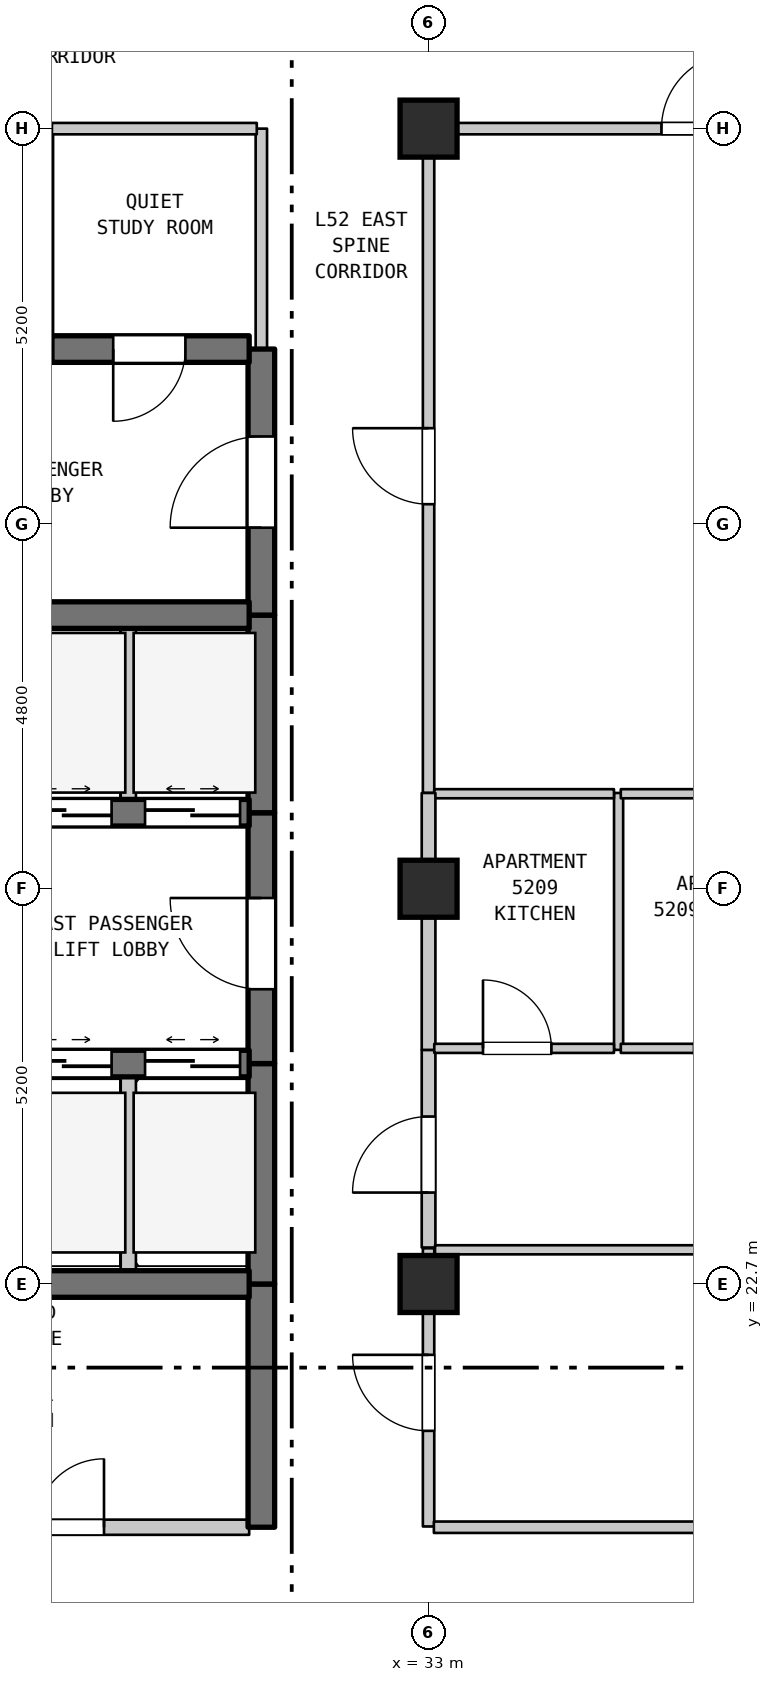
"""IFC4 building model, lengths in metres.
Left out: names, types, materials, properties, quantities, classifications, styles, units other than length and angle.
Written with IfcOpenShell. Run it as: python <this file> out.ifc"""

import sys

from ifc_helpers import new_model, si_unit, direction, frame, frame_2d, origin, origin_2d, place, context, subcontext, project, spatial, rectangle, extrude, element, fill, save


model = new_model("IFC4")
c1 = context("Model", 3, precision=1e-05, world=origin(), true_north=direction((0.0, 1.0)))
c2 = subcontext(c1, "Body", "Model", "MODEL_VIEW")
j1 = project(units=[si_unit("LENGTHUNIT", "METRE"), si_unit("PLANEANGLEUNIT", "RADIAN")], contexts=[c1])
p1 = place(None, origin())
s1 = spatial("IfcSite", under=j1, at=p1, CompositionType="ELEMENT")
p2 = place(p1, origin())
s2 = spatial("IfcBuilding", under=s1, at=p2, CompositionType="ELEMENT")
p3 = place(p2, frame((0.0, 0.0, 210.6)))
s3 = spatial("IfcBuildingStorey", under=s2, at=p3, CompositionType="ELEMENT", Elevation=210.6)
for number, where, z_axis, x_axis in (
    (1, (33.0, 22.7, 0.0), (0.0, 0.0, 1.0), (1.0, 0.0, 0.0)),
    (2, (33.0, 27.9, 0.0), (0.0, 0.0, 1.0), (1.0, 0.0, 0.0)),
    (3, (33.0, 37.9, 0.0), (0.0, 0.0, 1.0), (1.0, 0.0, 0.0)),
):
    element("IfcColumn", number, at=place(p3, frame(where, z_axis=z_axis, x_axis=x_axis)), inside=s3, PredefinedType="COLUMN", context=c2, shape_type="SweptSolid", body=[
        extrude(rectangle(XDim=0.75, YDim=0.75, at=origin_2d()), origin(), (0.0, 0.0, 1.0), 3.7),
    ])
p4 = place(p3, frame((28.0, 35.0, 0.0), z_axis=(0.0, 0.0, 1.0), x_axis=(0.0, 1.0, 0.0)))
e4 = element("IfcWall", 4, at=p4, inside=s3, PredefinedType="PARTITIONING", context=c2, shape_type="SweptSolid", body=[
    extrude(rectangle(XDim=2.9, YDim=0.12, at=frame_2d((1.45, 0.0))), origin(), (0.0, 0.0, 1.0), 3.39),
])
p5 = place(p3, frame((29.05, 22.7, 0.0), z_axis=(0.0, 0.0, 1.0), x_axis=(0.0, 1.0, 0.0)))
e5 = element("IfcWall", 5, at=p5, inside=s3, PredefinedType="STANDARD", context=c2, shape_type="SweptSolid", body=[
    extrude(rectangle(XDim=2.9, YDim=0.2, at=frame_2d((1.45, 0.0))), origin(), (0.0, 0.0, 1.0), 3.39),
])
p6 = place(p3, frame((29.05, 28.9, 0.0), z_axis=(0.0, 0.0, 1.0), x_axis=(0.0, 1.0, 0.0)))
e6 = element("IfcWall", 6, at=p6, inside=s3, PredefinedType="STANDARD", context=c2, shape_type="SweptSolid", body=[
    extrude(rectangle(XDim=2.6, YDim=0.2, at=frame_2d((1.3, 0.0))), origin(), (0.0, 0.0, 1.0), 3.39),
])
p7 = place(p3, frame((30.8, 19.5, 0.0), z_axis=(0.0, 0.0, 1.0), x_axis=(0.0, 1.0, 0.0)))
e7 = element("IfcWall", 7, at=p7, inside=s3, PredefinedType="SHEAR", context=c2, shape_type="SweptSolid", body=[
    extrude(rectangle(XDim=3.2, YDim=0.35, at=frame_2d((1.6, 0.0))), origin(), (0.0, 0.0, 1.0), 3.39),
])
p8 = place(p3, frame((30.8, 22.7, 0.0), z_axis=(0.0, 0.0, 1.0), x_axis=(0.0, 1.0, 0.0)))
e8 = element("IfcWall", 8, at=p8, inside=s3, PredefinedType="SHEAR", context=c2, shape_type="SweptSolid", body=[
    extrude(rectangle(XDim=2.9, YDim=0.35, at=frame_2d((1.45, 0.0))), origin(), (0.0, 0.0, 1.0), 3.39),
])
p9 = place(p3, frame((30.8, 25.6, 0.0), z_axis=(0.0, 0.0, 1.0), x_axis=(0.0, 1.0, 0.0)))
e9 = element("IfcWall", 9, at=p9, inside=s3, PredefinedType="SHEAR", context=c2, shape_type="SweptSolid", body=[
    extrude(rectangle(XDim=3.3, YDim=0.35, at=frame_2d((1.65, 0.0))), origin(), (0.0, 0.0, 1.0), 3.39),
])
p10 = place(p9, frame((0.978, 0.0, 0.0)))
e10 = element("IfcOpeningElement", 10, at=p10, cuts=e9, PredefinedType="OPENING", context=c2, shape_type="SweptSolid", body=[
    extrude(rectangle(XDim=1.2, YDim=2.2, at=frame_2d((0.6, 1.1))), frame((0.0, 0.185, 0.0), z_axis=(0.0, -1.0, 0.0), x_axis=(1.0, 0.0, 0.0)), (0.0, 0.0, 1.0), 0.37),
])
p11 = place(p3, frame((30.8, 28.9, 0.0), z_axis=(0.0, 0.0, 1.0), x_axis=(0.0, 1.0, 0.0)))
e11 = element("IfcWall", 11, at=p11, inside=s3, PredefinedType="SHEAR", context=c2, shape_type="SweptSolid", body=[
    extrude(rectangle(XDim=2.6, YDim=0.35, at=frame_2d((1.3, 0.0))), origin(), (0.0, 0.0, 1.0), 3.39),
])
p12 = place(p3, frame((30.8, 31.5, 0.0), z_axis=(0.0, 0.0, 1.0), x_axis=(0.0, 1.0, 0.0)))
e12 = element("IfcWall", 12, at=p12, inside=s3, PredefinedType="SHEAR", context=c2, shape_type="SweptSolid", body=[
    extrude(rectangle(XDim=3.5, YDim=0.35, at=frame_2d((1.75, 0.0))), origin(), (0.0, 0.0, 1.0), 3.39),
])
p13 = place(p12, frame((1.15, 0.0, 0.0)))
e13 = element("IfcOpeningElement", 13, at=p13, cuts=e12, PredefinedType="OPENING", context=c2, shape_type="SweptSolid", body=[
    extrude(rectangle(XDim=1.2, YDim=2.2, at=frame_2d((0.6, 1.1))), frame((0.0, 0.185, 0.0), z_axis=(0.0, -1.0, 0.0), x_axis=(1.0, 0.0, 0.0)), (0.0, 0.0, 1.0), 0.37),
])
p14 = place(p3, frame((30.8, 35.0, 0.0), z_axis=(0.0, 0.0, 1.0), x_axis=(0.0, 1.0, 0.0)))
e14 = element("IfcWall", 14, at=p14, inside=s3, PredefinedType="STANDARD", context=c2, shape_type="SweptSolid", body=[
    extrude(rectangle(XDim=2.9, YDim=0.15, at=frame_2d((1.45, 0.0))), origin(), (0.0, 0.0, 1.0), 3.39),
])
p15 = place(p3, frame((33.0, 19.51, 0.0), z_axis=(0.0, 0.0, 1.0), x_axis=(0.0, 1.0, 0.0)))
e15 = element("IfcWall", 15, at=p15, inside=s3, PredefinedType="STANDARD", context=c2, shape_type="SweptSolid", body=[
    extrude(rectangle(XDim=3.66, YDim=0.15, at=frame_2d((1.83, 0.0))), origin(), (0.0, 0.0, 1.0), 2.99),
])
p16 = place(p15, frame((1.258, 0.0, 0.0)))
e16 = element("IfcOpeningElement", 16, at=p16, cuts=e15, PredefinedType="OPENING", context=c2, shape_type="SweptSolid", body=[
    extrude(rectangle(XDim=1.0, YDim=2.15, at=frame_2d((0.5, 1.075))), frame((0.0, 0.085, 0.0), z_axis=(0.0, -1.0, 0.0), x_axis=(1.0, 0.0, 0.0)), (0.0, 0.0, 1.0), 0.17),
])
p17 = place(p3, frame((33.0, 23.18, 0.0), z_axis=(0.0, 0.0, 1.0), x_axis=(0.0, 1.0, 0.0)))
e17 = element("IfcWall", 17, at=p17, inside=s3, PredefinedType="STANDARD", context=c2, shape_type="SweptSolid", body=[
    extrude(rectangle(XDim=2.6, YDim=0.18, at=frame_2d((1.3, 0.0))), origin(), (0.0, 0.0, 1.0), 2.99),
])
p18 = place(p17, frame((0.723, 0.0, 0.0)))
e18 = element("IfcOpeningElement", 18, at=p18, cuts=e17, PredefinedType="OPENING", context=c2, shape_type="SweptSolid", body=[
    extrude(rectangle(XDim=1.0, YDim=2.15, at=frame_2d((0.5, 1.075))), frame((0.0, 0.1, 0.0), z_axis=(0.0, -1.0, 0.0), x_axis=(1.0, 0.0, 0.0)), (0.0, 0.0, 1.0), 0.2),
])
p19 = place(p3, frame((33.0, 25.78, 0.0), z_axis=(0.0, 0.0, 1.0), x_axis=(0.0, 1.0, 0.0)))
e19 = element("IfcWall", 19, at=p19, inside=s3, PredefinedType="STANDARD", context=c2, shape_type="SweptSolid", body=[
    extrude(rectangle(XDim=2.12, YDim=0.18, at=frame_2d((1.06, 0.0))), origin(), (0.0, 0.0, 1.0), 2.99),
])
p20 = place(p3, frame((33.0, 29.16, 0.0), z_axis=(0.0, 0.0, 1.0), x_axis=(0.0, 1.0, 0.0)))
e20 = element("IfcWall", 20, at=p20, inside=s3, PredefinedType="STANDARD", context=c2, shape_type="SweptSolid", body=[
    extrude(rectangle(XDim=8.74, YDim=0.15, at=frame_2d((4.37, 0.0))), origin(), (0.0, 0.0, 1.0), 2.89),
])
p21 = place(p20, frame((3.799, 0.0, 0.0)))
e21 = element("IfcOpeningElement", 21, at=p21, cuts=e20, PredefinedType="OPENING", context=c2, shape_type="SweptSolid", body=[
    extrude(rectangle(XDim=1.0, YDim=2.15, at=frame_2d((0.5, 1.075))), frame((0.0, 0.085, 0.0), z_axis=(0.0, -1.0, 0.0), x_axis=(1.0, 0.0, 0.0)), (0.0, 0.0, 1.0), 0.17),
])
p22 = place(p3, frame((35.5, 25.78, 0.0), z_axis=(0.0, 0.0, 1.0), x_axis=(0.0, 1.0, 0.0)))
e22 = element("IfcWall", 22, at=p22, inside=s3, PredefinedType="PARTITIONING", context=c2, shape_type="SweptSolid", body=[
    extrude(rectangle(XDim=3.38, YDim=0.12, at=frame_2d((1.69, 0.0))), origin(), (0.0, 0.0, 1.0), 3.39),
])
p23 = place(p3, frame((25.985, 19.5, 0.0), z_axis=(0.0, 0.0, 1.0), x_axis=(1.0, 0.0, 0.0)))
e23 = element("IfcWall", 23, at=p23, inside=s3, PredefinedType="STANDARD", context=c2, shape_type="SweptSolid", body=[
    extrude(rectangle(XDim=4.655, YDim=0.2, at=frame_2d((2.327, 0.0))), origin(), (0.0, 0.0, 1.0), 3.39),
])
p24 = place(p23, frame((1.845, 0.0, 0.0)))
e24 = element("IfcOpeningElement", 24, at=p24, cuts=e23, PredefinedType="OPENING", context=c2, shape_type="SweptSolid", body=[
    extrude(rectangle(XDim=0.9, YDim=2.15, at=frame_2d((0.45, 1.075))), frame((0.0, 0.11, 0.0), z_axis=(0.0, -1.0, 0.0), x_axis=(1.0, 0.0, 0.0)), (0.0, 0.0, 1.0), 0.22),
])
p25 = place(p3, frame((33.07, 19.5, 0.0), z_axis=(0.0, 0.0, 1.0), x_axis=(1.0, 0.0, 0.0)))
e25 = element("IfcWall", 25, at=p25, inside=s3, PredefinedType="STANDARD", context=c2, shape_type="SweptSolid", body=[
    extrude(rectangle(XDim=21.51, YDim=0.15, at=frame_2d((10.755, 0.0))), origin(), (0.0, 0.0, 1.0), 3.39),
])
p26 = place(p25, frame((10.185, 0.0, 0.0)))
e26 = element("IfcOpeningElement", 26, at=p26, cuts=e25, PredefinedType="OPENING", context=c2, shape_type="SweptSolid", body=[
    extrude(rectangle(XDim=1.0, YDim=2.15, at=frame_2d((0.5, 1.075))), frame((0.0, 0.085, 0.0), z_axis=(0.0, -1.0, 0.0), x_axis=(1.0, 0.0, 0.0)), (0.0, 0.0, 1.0), 0.17),
])
p27 = place(p3, frame((27.46, 22.7, 0.0), z_axis=(0.0, 0.0, 1.0), x_axis=(1.0, 0.0, 0.0)))
e27 = element("IfcWall", 27, at=p27, inside=s3, PredefinedType="SHEAR", context=c2, shape_type="SweptSolid", body=[
    extrude(rectangle(XDim=3.18, YDim=0.35, at=frame_2d((1.59, 0.0))), origin(), (0.0, 0.0, 1.0), 3.39),
])
p28 = place(p3, frame((33.085, 23.15, 0.0), z_axis=(0.0, 0.0, 1.0), x_axis=(1.0, 0.0, 0.0)))
e28 = element("IfcWall", 28, at=p28, inside=s3, PredefinedType="PARTITIONING", context=c2, shape_type="SweptSolid", body=[
    extrude(rectangle(XDim=23.905, YDim=0.12, at=frame_2d((11.953, 0.0))), origin(), (0.0, 0.0, 1.0), 3.39),
])
p29 = place(p3, frame((27.46, 25.6, 0.0), z_axis=(0.0, 0.0, 1.0), x_axis=(1.0, 0.0, 0.0)))
e29 = element("IfcWall", 29, at=p29, inside=s3, PredefinedType="SHEAR", context=c2, shape_type="SweptSolid", body=[
    extrude(rectangle(XDim=3.18, YDim=0.35, at=frame_2d((1.59, 0.0))), origin(), (0.0, 0.0, 1.0), 3.39),
])
p30 = place(p29, frame((0.12, 0.0, 0.0)))
e30 = element("IfcOpeningElement", 30, at=p30, cuts=e29, PredefinedType="OPENING", context=c2, shape_type="SweptSolid", body=[
    extrude(rectangle(XDim=1.25, YDim=2.2, at=frame_2d((0.625, 1.1))), frame((0.0, 0.185, 0.0), z_axis=(0.0, -1.0, 0.0), x_axis=(1.0, 0.0, 0.0)), (0.0, 0.0, 1.0), 0.37),
])
p31 = place(p29, frame((1.81, 0.0, 0.0)))
e31 = element("IfcOpeningElement", 31, at=p31, cuts=e29, PredefinedType="OPENING", context=c2, shape_type="SweptSolid", body=[
    extrude(rectangle(XDim=1.25, YDim=2.2, at=frame_2d((0.625, 1.1))), frame((0.0, 0.185, 0.0), z_axis=(0.0, -1.0, 0.0), x_axis=(1.0, 0.0, 0.0)), (0.0, 0.0, 1.0), 0.37),
])
p32 = place(p3, frame((33.075, 25.8, 0.0), z_axis=(0.0, 0.0, 1.0), x_axis=(1.0, 0.0, 0.0)))
e32 = element("IfcWall", 32, at=p32, inside=s3, PredefinedType="PARTITIONING", context=c2, shape_type="SweptSolid", body=[
    extrude(rectangle(XDim=2.364, YDim=0.12, at=frame_2d((1.182, 0.0))), origin(), (0.0, 0.0, 1.0), 3.39),
])
p33 = place(p32, frame((0.641, 0.0, 0.0)))
e33 = element("IfcOpeningElement", 33, at=p33, cuts=e32, PredefinedType="OPENING", context=c2, shape_type="SweptSolid", body=[
    extrude(rectangle(XDim=0.9, YDim=2.15, at=frame_2d((0.45, 1.075))), frame((0.0, 0.07, 0.0), z_axis=(0.0, -1.0, 0.0), x_axis=(1.0, 0.0, 0.0)), (0.0, 0.0, 1.0), 0.14),
])
p34 = place(p3, frame((35.529, 25.8, 0.0), z_axis=(0.0, 0.0, 1.0), x_axis=(1.0, 0.0, 0.0)))
e34 = element("IfcWall", 34, at=p34, inside=s3, PredefinedType="PARTITIONING", context=c2, shape_type="SweptSolid", body=[
    extrude(rectangle(XDim=2.826, YDim=0.12, at=frame_2d((1.413, 0.0))), origin(), (0.0, 0.0, 1.0), 3.39),
])
p35 = place(p34, frame((0.963, 0.0, 0.0)))
e35 = element("IfcOpeningElement", 35, at=p35, cuts=e34, PredefinedType="OPENING", context=c2, shape_type="SweptSolid", body=[
    extrude(rectangle(XDim=0.9, YDim=2.1, at=frame_2d((0.45, 1.05))), frame((0.0, 0.07, 0.0), z_axis=(0.0, -1.0, 0.0), x_axis=(1.0, 0.0, 0.0)), (0.0, 0.0, 1.0), 0.14),
])
p36 = place(p3, frame((27.46, 28.9, 0.0), z_axis=(0.0, 0.0, 1.0), x_axis=(1.0, 0.0, 0.0)))
e36 = element("IfcWall", 36, at=p36, inside=s3, PredefinedType="SHEAR", context=c2, shape_type="SweptSolid", body=[
    extrude(rectangle(XDim=3.18, YDim=0.35, at=frame_2d((1.59, 0.0))), origin(), (0.0, 0.0, 1.0), 3.39),
])
p37 = place(p36, frame((0.12, 0.0, 0.0)))
e37 = element("IfcOpeningElement", 37, at=p37, cuts=e36, PredefinedType="OPENING", context=c2, shape_type="SweptSolid", body=[
    extrude(rectangle(XDim=1.25, YDim=2.2, at=frame_2d((0.625, 1.1))), frame((0.0, 0.185, 0.0), z_axis=(0.0, -1.0, 0.0), x_axis=(1.0, 0.0, 0.0)), (0.0, 0.0, 1.0), 0.37),
])
p38 = place(p36, frame((1.81, 0.0, 0.0)))
e38 = element("IfcOpeningElement", 38, at=p38, cuts=e36, PredefinedType="OPENING", context=c2, shape_type="SweptSolid", body=[
    extrude(rectangle(XDim=1.25, YDim=2.2, at=frame_2d((0.625, 1.1))), frame((0.0, 0.185, 0.0), z_axis=(0.0, -1.0, 0.0), x_axis=(1.0, 0.0, 0.0)), (0.0, 0.0, 1.0), 0.37),
])
p39 = place(p3, frame((33.075, 29.15, 0.0), z_axis=(0.0, 0.0, 1.0), x_axis=(1.0, 0.0, 0.0)))
e39 = element("IfcWall", 39, at=p39, inside=s3, PredefinedType="PARTITIONING", context=c2, shape_type="SweptSolid", body=[
    extrude(rectangle(XDim=2.364, YDim=0.12, at=frame_2d((1.182, 0.0))), origin(), (0.0, 0.0, 1.0), 3.39),
])
p40 = place(p3, frame((35.529, 29.15, 0.0), z_axis=(0.0, 0.0, 1.0), x_axis=(1.0, 0.0, 0.0)))
e40 = element("IfcWall", 40, at=p40, inside=s3, PredefinedType="PARTITIONING", context=c2, shape_type="SweptSolid", body=[
    extrude(rectangle(XDim=2.826, YDim=0.12, at=frame_2d((1.413, 0.0))), origin(), (0.0, 0.0, 1.0), 3.39),
])
p41 = place(p3, frame((27.46, 31.5, 0.0), z_axis=(0.0, 0.0, 1.0), x_axis=(1.0, 0.0, 0.0)))
e41 = element("IfcWall", 41, at=p41, inside=s3, PredefinedType="SHEAR", context=c2, shape_type="SweptSolid", body=[
    extrude(rectangle(XDim=3.18, YDim=0.35, at=frame_2d((1.59, 0.0))), origin(), (0.0, 0.0, 1.0), 3.39),
])
p42 = place(p3, frame((28.045, 35.0, 0.0), z_axis=(0.0, 0.0, 1.0), x_axis=(1.0, 0.0, 0.0)))
e42 = element("IfcWall", 42, at=p42, inside=s3, PredefinedType="SHEAR", context=c2, shape_type="SweptSolid", body=[
    extrude(rectangle(XDim=2.595, YDim=0.35, at=frame_2d((1.297, 0.0))), origin(), (0.0, 0.0, 1.0), 3.39),
])
p43 = place(p42, frame((0.806, 0.0, 0.0)))
e43 = element("IfcOpeningElement", 43, at=p43, cuts=e42, PredefinedType="OPENING", context=c2, shape_type="SweptSolid", body=[
    extrude(rectangle(XDim=0.95, YDim=2.15, at=frame_2d((0.475, 1.075))), frame((0.0, 0.185, 0.0), z_axis=(0.0, -1.0, 0.0), x_axis=(1.0, 0.0, 0.0)), (0.0, 0.0, 1.0), 0.37),
])
p44 = place(p3, frame((28.045, 37.9, 0.0), z_axis=(0.0, 0.0, 1.0), x_axis=(1.0, 0.0, 0.0)))
e44 = element("IfcWall", 44, at=p44, inside=s3, PredefinedType="STANDARD", context=c2, shape_type="SweptSolid", body=[
    extrude(rectangle(XDim=2.695, YDim=0.15, at=frame_2d((1.348, 0.0))), origin(), (0.0, 0.0, 1.0), 2.89),
])
p45 = place(p3, frame((33.06, 37.9, 0.0), z_axis=(0.0, 0.0, 1.0), x_axis=(1.0, 0.0, 0.0)))
e45 = element("IfcWall", 45, at=p45, inside=s3, PredefinedType="STANDARD", context=c2, shape_type="SweptSolid", body=[
    extrude(rectangle(XDim=7.164, YDim=0.15, at=frame_2d((3.582, 0.0))), origin(), (0.0, 0.0, 1.0), 3.39),
])
p46 = place(p45, frame((3.004, 0.0, 0.0)))
e46 = element("IfcOpeningElement", 46, at=p46, cuts=e45, PredefinedType="OPENING", context=c2, shape_type="SweptSolid", body=[
    extrude(rectangle(XDim=1.0, YDim=2.15, at=frame_2d((0.5, 1.075))), frame((0.0, 0.085, 0.0), z_axis=(0.0, -1.0, 0.0), x_axis=(1.0, 0.0, 0.0)), (0.0, 0.0, 1.0), 0.17),
])
p47 = place(p3, frame((33.0, 27.9, 0.0), z_axis=(0.0, 0.0, 1.0), x_axis=(0.0, 1.0, 0.0)))
e47 = element("IfcWall", 47, at=p47, inside=s3, PredefinedType="STANDARD", context=c2, shape_type="SweptSolid", body=[
    extrude(rectangle(XDim=1.26, YDim=0.18, at=frame_2d((0.63, 0.0))), origin(), (0.0, 0.0, 1.0), 2.89),
])
p48 = place(p10, origin())
e48 = element("IfcDoor", 48, at=p48, inside=s3, OperationType="SINGLE_SWING_RIGHT", PredefinedType="DOOR", context=c2, shape_type="SweptSolid", body=[
    extrude(rectangle(XDim=1.2, YDim=2.2, at=frame_2d((0.6, 1.1))), frame((0.0, 0.025, 0.0), z_axis=(0.0, -1.0, 0.0), x_axis=(1.0, 0.0, 0.0)), (0.0, 0.0, 1.0), 0.05),
])
fill(e10, e48)
p49 = place(p13, origin())
e49 = element("IfcDoor", 49, at=p49, inside=s3, OperationType="SINGLE_SWING_LEFT", PredefinedType="DOOR", context=c2, shape_type="SweptSolid", body=[
    extrude(rectangle(XDim=1.2, YDim=2.2, at=frame_2d((0.6, 1.1))), frame((0.0, 0.025, 0.0), z_axis=(0.0, -1.0, 0.0), x_axis=(1.0, 0.0, 0.0)), (0.0, 0.0, 1.0), 0.05),
])
fill(e13, e49)
p50 = place(p16, origin())
e50 = element("IfcDoor", 50, at=p50, inside=s3, OperationType="SINGLE_SWING_RIGHT", PredefinedType="DOOR", context=c2, shape_type="SweptSolid", body=[
    extrude(rectangle(XDim=1.0, YDim=2.15, at=frame_2d((0.5, 1.075))), frame((0.0, 0.025, 0.0), z_axis=(0.0, -1.0, 0.0), x_axis=(1.0, 0.0, 0.0)), (0.0, 0.0, 1.0), 0.05),
])
fill(e16, e50)
p51 = place(p18, origin())
e51 = element("IfcDoor", 51, at=p51, inside=s3, OperationType="SINGLE_SWING_LEFT", PredefinedType="DOOR", context=c2, shape_type="SweptSolid", body=[
    extrude(rectangle(XDim=1.0, YDim=2.15, at=frame_2d((0.5, 1.075))), frame((0.0, 0.025, 0.0), z_axis=(0.0, -1.0, 0.0), x_axis=(1.0, 0.0, 0.0)), (0.0, 0.0, 1.0), 0.05),
])
fill(e18, e51)
p52 = place(p21, origin())
e52 = element("IfcDoor", 52, at=p52, inside=s3, OperationType="SINGLE_SWING_RIGHT", PredefinedType="DOOR", context=c2, shape_type="SweptSolid", body=[
    extrude(rectangle(XDim=1.0, YDim=2.15, at=frame_2d((0.5, 1.075))), frame((0.0, 0.025, 0.0), z_axis=(0.0, -1.0, 0.0), x_axis=(1.0, 0.0, 0.0)), (0.0, 0.0, 1.0), 0.05),
])
fill(e21, e52)
p53 = place(p24, origin())
e53 = element("IfcDoor", 53, at=p53, inside=s3, OperationType="SINGLE_SWING_RIGHT", PredefinedType="DOOR", context=c2, shape_type="SweptSolid", body=[
    extrude(rectangle(XDim=0.9, YDim=2.15, at=frame_2d((0.45, 1.075))), frame((0.0, 0.025, 0.0), z_axis=(0.0, -1.0, 0.0), x_axis=(1.0, 0.0, 0.0)), (0.0, 0.0, 1.0), 0.05),
])
fill(e24, e53)
p54 = place(p30, origin())
e54 = element("IfcDoor", 54, at=p54, inside=s3, OperationType="DOUBLE_DOOR_SLIDING", PredefinedType="DOOR", context=c2, shape_type="SweptSolid", body=[
    extrude(rectangle(XDim=1.25, YDim=2.2, at=frame_2d((0.625, 1.1))), frame((0.0, 0.025, 0.0), z_axis=(0.0, -1.0, 0.0), x_axis=(1.0, 0.0, 0.0)), (0.0, 0.0, 1.0), 0.05),
])
fill(e30, e54)
p55 = place(p31, origin())
e55 = element("IfcDoor", 55, at=p55, inside=s3, OperationType="DOUBLE_DOOR_SLIDING", PredefinedType="DOOR", context=c2, shape_type="SweptSolid", body=[
    extrude(rectangle(XDim=1.25, YDim=2.2, at=frame_2d((0.625, 1.1))), frame((0.0, 0.025, 0.0), z_axis=(0.0, -1.0, 0.0), x_axis=(1.0, 0.0, 0.0)), (0.0, 0.0, 1.0), 0.05),
])
fill(e31, e55)
p56 = place(p33, origin())
e56 = element("IfcDoor", 56, at=p56, inside=s3, OperationType="SINGLE_SWING_LEFT", PredefinedType="DOOR", context=c2, shape_type="SweptSolid", body=[
    extrude(rectangle(XDim=0.9, YDim=2.15, at=frame_2d((0.45, 1.075))), frame((0.0, 0.025, 0.0), z_axis=(0.0, -1.0, 0.0), x_axis=(1.0, 0.0, 0.0)), (0.0, 0.0, 1.0), 0.05),
])
fill(e33, e56)
p57 = place(p37, origin())
e57 = element("IfcDoor", 57, at=p57, inside=s3, OperationType="DOUBLE_DOOR_SLIDING", PredefinedType="DOOR", context=c2, shape_type="SweptSolid", body=[
    extrude(rectangle(XDim=1.25, YDim=2.2, at=frame_2d((0.625, 1.1))), frame((0.0, 0.025, 0.0), z_axis=(0.0, -1.0, 0.0), x_axis=(1.0, 0.0, 0.0)), (0.0, 0.0, 1.0), 0.05),
])
fill(e37, e57)
p58 = place(p38, origin())
e58 = element("IfcDoor", 58, at=p58, inside=s3, OperationType="DOUBLE_DOOR_SLIDING", PredefinedType="DOOR", context=c2, shape_type="SweptSolid", body=[
    extrude(rectangle(XDim=1.25, YDim=2.2, at=frame_2d((0.625, 1.1))), frame((0.0, 0.025, 0.0), z_axis=(0.0, -1.0, 0.0), x_axis=(1.0, 0.0, 0.0)), (0.0, 0.0, 1.0), 0.05),
])
fill(e38, e58)
p59 = place(p43, frame((0.95, 0.0, 0.0), z_axis=(0.0, 0.0, 1.0), x_axis=(-1.0, 0.0, 0.0)))
e59 = element("IfcDoor", 59, at=p59, inside=s3, OperationType="SINGLE_SWING_LEFT", PredefinedType="DOOR", context=c2, shape_type="SweptSolid", body=[
    extrude(rectangle(XDim=0.95, YDim=2.15, at=frame_2d((0.475, 1.075))), frame((0.0, 0.025, 0.0), z_axis=(0.0, -1.0, 0.0), x_axis=(1.0, 0.0, 0.0)), (0.0, 0.0, 1.0), 0.05),
])
fill(e43, e59)
p60 = place(p46, origin())
e60 = element("IfcDoor", 60, at=p60, inside=s3, OperationType="SINGLE_SWING_RIGHT", PredefinedType="DOOR", context=c2, shape_type="SweptSolid", body=[
    extrude(rectangle(XDim=1.0, YDim=2.15, at=frame_2d((0.5, 1.075))), frame((0.0, 0.025, 0.0), z_axis=(0.0, -1.0, 0.0), x_axis=(1.0, 0.0, 0.0)), (0.0, 0.0, 1.0), 0.05),
])
fill(e46, e60)
save(model, sys.argv[1])
